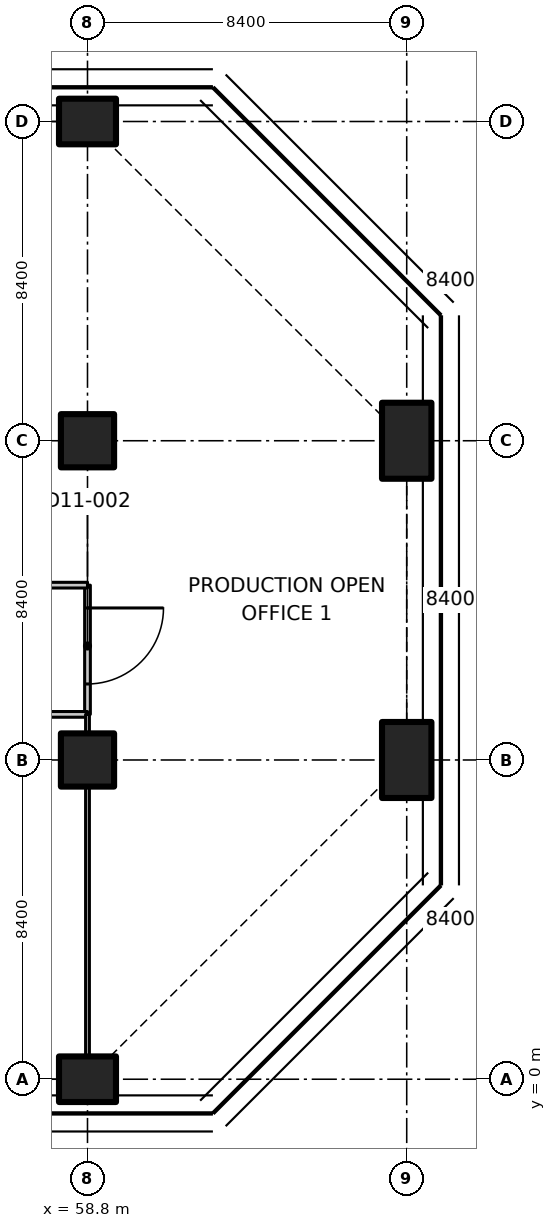
"""IFC4 building model, lengths in metres.
Left out: names, types, materials, properties, quantities, classifications, styles, units other than length and angle.
Written with IfcOpenShell. Run it as: python <this file> out.ifc"""

import sys

from ifc_helpers import new_model, si_unit, direction, frame, frame_2d, origin, origin_2d, place, context, subcontext, project, spatial, rectangle, extrude, element, fill, save


model = new_model("IFC4")
c1 = context("Model", 3, precision=1e-05, world=origin(), true_north=direction((0.0, 1.0)))
c2 = subcontext(c1, "Body", "Model", "MODEL_VIEW")
j1 = project(units=[si_unit("LENGTHUNIT", "METRE"), si_unit("PLANEANGLEUNIT", "RADIAN")], contexts=[c1])
p1 = place(None, origin())
s1 = spatial("IfcSite", under=j1, at=p1, CompositionType="ELEMENT")
p2 = place(p1, origin())
s2 = spatial("IfcBuilding", under=s1, at=p2, CompositionType="ELEMENT")
p3 = place(p2, frame((0.0, 0.0, 83.3)))
s3 = spatial("IfcBuildingStorey", under=s2, at=p3, CompositionType="ELEMENT", Elevation=83.3)
p4 = place(p3, frame((58.8, 0.0, 0.0), z_axis=(0.0, 0.0, 1.0), x_axis=(0.0, 1.0, 0.0)))
e1 = element("IfcColumn", 1, at=p4, inside=s3, PredefinedType="COLUMN", context=c2, shape_type="SweptSolid", body=[
    extrude(rectangle(XDim=1.2, YDim=1.5, at=origin_2d()), origin(), (0.0, 0.0, 1.0), 3.3),
])
for number, where, z_axis, x_axis in (
    (2, (58.8, 8.4, 0.0), (0.0, 0.0, 1.0), (1.0, 0.0, 0.0)),
    (3, (58.8, 16.8, 0.0), (0.0, 0.0, 1.0), (1.0, 0.0, 0.0)),
):
    element("IfcColumn", number, at=place(p3, frame(where, z_axis=z_axis, x_axis=x_axis)), inside=s3, PredefinedType="COLUMN", context=c2, shape_type="SweptSolid", body=[
        extrude(rectangle(XDim=1.4, YDim=1.4, at=origin_2d()), origin(), (0.0, 0.0, 1.0), 3.3),
    ])
p5 = place(p3, frame((58.8, 25.2, 0.0), z_axis=(0.0, 0.0, 1.0), x_axis=(0.0, 1.0, 0.0)))
e4 = element("IfcColumn", 4, at=p5, inside=s3, PredefinedType="COLUMN", context=c2, shape_type="SweptSolid", body=[
    extrude(rectangle(XDim=1.2, YDim=1.5, at=origin_2d()), origin(), (0.0, 0.0, 1.0), 3.3),
])
for number, where, z_axis, x_axis in (
    (5, (67.2, 8.4, 0.0), (0.0, 0.0, 1.0), (1.0, 0.0, 0.0)),
    (6, (67.2, 16.8, 0.0), (0.0, 0.0, 1.0), (1.0, 0.0, 0.0)),
):
    element("IfcColumn", number, at=place(p3, frame(where, z_axis=z_axis, x_axis=x_axis)), inside=s3, PredefinedType="COLUMN", context=c2, shape_type="SweptSolid", body=[
        extrude(rectangle(XDim=1.3, YDim=2.0, at=origin_2d()), origin(), (0.0, 0.0, 1.0), 3.3),
    ])
p6 = place(p3, frame((58.8, 13.0, 0.0), z_axis=(0.0, 0.0, 1.0), x_axis=(0.0, -1.0, 0.0)))
e7 = element("IfcWall", 7, at=p6, inside=s3, PredefinedType="PARTITIONING", context=c2, shape_type="SweptSolid", body=[
    extrude(rectangle(XDim=3.4, YDim=0.15, at=frame_2d((1.7, 0.0))), origin(), (0.0, 0.0, 1.0), 3.28),
])
p7 = place(p6, frame((0.6, 0.0, 0.0)))
e8 = element("IfcOpeningElement", 8, at=p7, cuts=e7, PredefinedType="OPENING", context=c2, shape_type="SweptSolid", body=[
    extrude(rectangle(XDim=2.0, YDim=2.4, at=frame_2d((1.0, 1.2))), frame((0.0, 0.085, 0.0), z_axis=(0.0, -1.0, 0.0), x_axis=(1.0, 0.0, 0.0)), (0.0, 0.0, 1.0), 0.17),
])
p8 = place(p3, frame((58.8, 9.6, 0.0), z_axis=(0.0, 0.0, 1.0), x_axis=(-1.0, 0.0, 0.0)))
e9 = element("IfcWall", 9, at=p8, inside=s3, PredefinedType="PARTITIONING", context=c2, shape_type="SweptSolid", body=[
    extrude(rectangle(XDim=4.2, YDim=0.15, at=frame_2d((2.1, 0.0))), origin(), (0.0, 0.0, 1.0), 3.28),
])
p9 = place(p8, frame((1.5, 0.0, 0.0)))
e10 = element("IfcOpeningElement", 10, at=p9, cuts=e9, PredefinedType="OPENING", context=c2, shape_type="SweptSolid", body=[
    extrude(rectangle(XDim=1.1, YDim=2.1, at=frame_2d((0.55, 1.05))), frame((0.0, 0.085, 0.0), z_axis=(0.0, -1.0, 0.0), x_axis=(1.0, 0.0, 0.0)), (0.0, 0.0, 1.0), 0.17),
])
p10 = place(p3, frame((54.6, 13.0, 0.0), z_axis=(0.0, 0.0, 1.0), x_axis=(1.0, 0.0, 0.0)))
e11 = element("IfcWall", 11, at=p10, inside=s3, PredefinedType="PARTITIONING", context=c2, shape_type="SweptSolid", body=[
    extrude(rectangle(XDim=4.2, YDim=0.15, at=frame_2d((2.1, 0.0))), origin(), (0.0, 0.0, 1.0), 3.28),
])
p11 = place(p10, frame((1.5, 0.0, 0.0)))
e12 = element("IfcOpeningElement", 12, at=p11, cuts=e11, PredefinedType="OPENING", context=c2, shape_type="SweptSolid", body=[
    extrude(rectangle(XDim=1.1, YDim=2.1, at=frame_2d((0.55, 1.05))), frame((0.0, 0.085, 0.0), z_axis=(0.0, -1.0, 0.0), x_axis=(1.0, 0.0, 0.0)), (0.0, 0.0, 1.0), 0.17),
])
p12 = place(p3, frame((58.8, 0.62, 0.0), z_axis=(0.0, 0.0, 1.0), x_axis=(0.0, 1.0, 0.0)))
e13 = element("IfcWall", 13, at=p12, inside=s3, PredefinedType="PARTITIONING", context=c2, shape_type="SweptSolid", body=[
    extrude(rectangle(XDim=7.06, YDim=0.1, at=frame_2d((3.53, 0.0))), origin(), (0.0, 0.0, 1.0), 3.28),
])
p13 = place(p3, frame((58.8, 9.12, 0.0), z_axis=(0.0, 0.0, 1.0), x_axis=(0.0, 1.0, 0.0)))
e14 = element("IfcWall", 14, at=p13, inside=s3, PredefinedType="PARTITIONING", context=c2, shape_type="SweptSolid", body=[
    extrude(rectangle(XDim=0.48, YDim=0.1, at=frame_2d((0.24, 0.0))), origin(), (0.0, 0.0, 1.0), 3.28),
])
p14 = place(p7, origin())
e15 = element("IfcDoor", 15, at=p14, inside=s3, OperationType="DOUBLE_DOOR_SINGLE_SWING", PredefinedType="DOOR", context=c2, shape_type="SweptSolid", body=[
    extrude(rectangle(XDim=2.0, YDim=2.4, at=frame_2d((1.0, 1.2))), frame((0.0, 0.025, 0.0), z_axis=(0.0, -1.0, 0.0), x_axis=(1.0, 0.0, 0.0)), (0.0, 0.0, 1.0), 0.05),
])
fill(e8, e15)
save(model, sys.argv[1])
